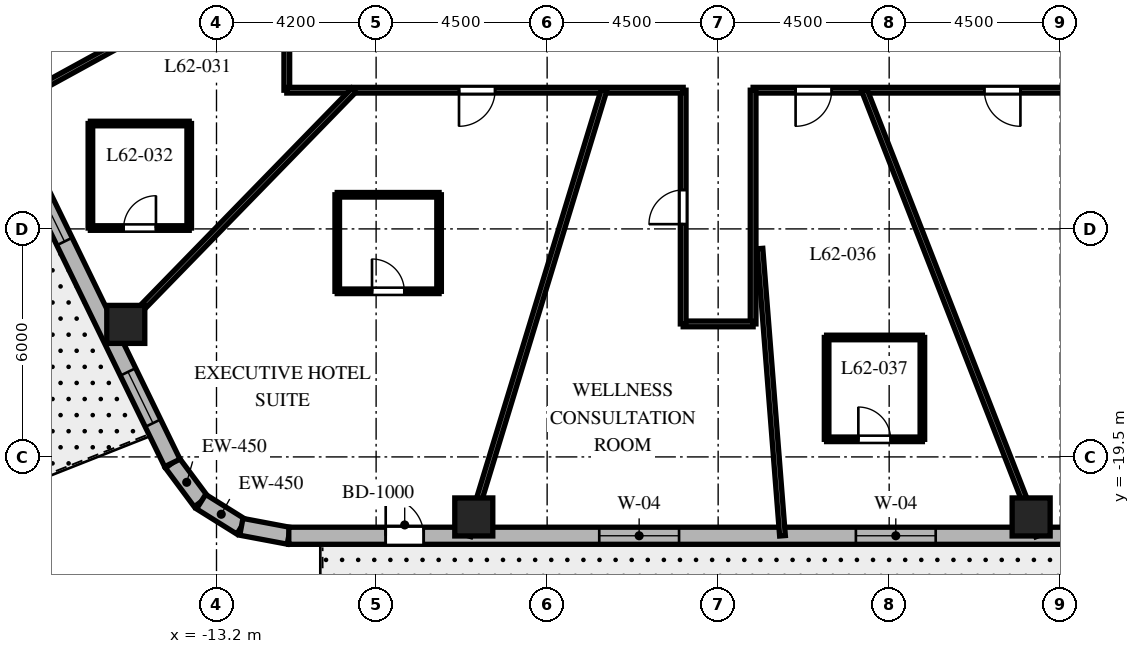
"""IFC4 building model, lengths in metres.
Left out: names, types, materials, properties, quantities, classifications, styles, units other than length and angle.
Written with IfcOpenShell. Run it as: python <this file> out.ifc"""

import sys

from ifc_helpers import new_model, si_unit, direction, frame, frame_2d, origin, origin_2d, place, context, subcontext, project, spatial, rectangle, extrude, element, fill, save


model = new_model("IFC4")
c1 = context("Model", 3, precision=1e-05, world=origin(), true_north=direction((0.0, 1.0)))
c2 = subcontext(c1, "Body", "Model", "MODEL_VIEW")
j1 = project(units=[si_unit("LENGTHUNIT", "METRE"), si_unit("PLANEANGLEUNIT", "RADIAN")], contexts=[c1])
p1 = place(None, origin())
s1 = spatial("IfcSite", under=j1, at=p1, CompositionType="ELEMENT")
p2 = place(p1, origin())
s2 = spatial("IfcBuilding", under=s1, at=p2, CompositionType="ELEMENT")
p3 = place(p2, frame((0.0, 0.0, 248.3)))
s3 = spatial("IfcBuildingStorey", under=s2, at=p3, CompositionType="ELEMENT", Elevation=248.3)
for number, where, z_axis, x_axis in (
    (1, (-6.43, -21.08, 0.0), (0.0, 0.0, 1.0), (1.0, 0.0, 0.0)),
    (2, (8.236, -21.08, 0.0), (0.0, 0.0, 1.0), (1.0, 0.0, 0.0)),
    (3, (-15.587, -16.013, 0.0), (0.0, 0.0, 1.0), (1.0, 0.0, 0.0)),
):
    element("IfcColumn", number, at=place(p3, frame(where, z_axis=z_axis, x_axis=x_axis)), inside=s3, PredefinedType="COLUMN", context=c2, shape_type="SweptSolid", body=[
        extrude(rectangle(XDim=1.0, YDim=1.0, at=origin_2d()), origin(), (0.0, 0.0, 1.0), 3.8),
    ])
p4 = place(p3, frame((-14.362, -19.658, 0.0), z_axis=(0.0, 0.0, 1.0), x_axis=(0.596642462792, -0.80250717853, 0.0)))
e4 = element("IfcWall", 4, at=p4, inside=s3, PredefinedType="SOLIDWALL", context=c2, shape_type="SweptSolid", body=[
    extrude(rectangle(XDim=1.27, YDim=0.45, at=frame_2d((0.635, 0.0))), origin(), (0.0, 0.0, 1.0), 3.5),
])
p5 = place(p3, frame((-13.604, -20.678, 0.0), z_axis=(0.0, 0.0, 1.0), x_axis=(0.847910404124, -0.53013955387, 0.0)))
e5 = element("IfcWall", 5, at=p5, inside=s3, PredefinedType="SOLIDWALL", context=c2, shape_type="SweptSolid", body=[
    extrude(rectangle(XDim=1.249, YDim=0.45, at=frame_2d((0.624, 0.0))), origin(), (0.0, 0.0, 1.0), 3.5),
])
p6 = place(p3, frame((-12.546, -21.34, 0.0), z_axis=(0.0, 0.0, 1.0), x_axis=(0.982686750835, -0.18527479519, 0.0)))
e6 = element("IfcWall", 6, at=p6, inside=s3, PredefinedType="SOLIDWALL", context=c2, shape_type="SweptSolid", body=[
    extrude(rectangle(XDim=1.27, YDim=0.45, at=frame_2d((0.635, 0.0))), origin(), (0.0, 0.0, 1.0), 3.5),
])
p7 = place(p3, frame((-11.298, -21.575, 0.0), z_axis=(0.0, 0.0, 1.0), x_axis=(1.0, 0.0, 0.0)))
e7 = element("IfcWall", 7, at=p7, inside=s3, PredefinedType="SOLIDWALL", context=c2, shape_type="SweptSolid", body=[
    extrude(rectangle(XDim=24.399, YDim=0.45, at=frame_2d((12.2, 0.0))), origin(), (0.0, 0.0, 1.0), 3.5),
])
p8 = place(p7, frame((2.55, 0.0, 0.0)))
e8 = element("IfcOpeningElement", 8, at=p8, cuts=e7, PredefinedType="OPENING", context=c2, shape_type="SweptSolid", body=[
    extrude(rectangle(XDim=1.0, YDim=2.15, at=frame_2d((0.5, 1.075))), frame((0.0, 0.235, 0.0), z_axis=(0.0, -1.0, 0.0), x_axis=(1.0, 0.0, 0.0)), (0.0, 0.0, 1.0), 0.47),
])
p9 = place(p7, frame((8.169, 0.0, 0.8)))
e9 = element("IfcOpeningElement", 9, at=p9, cuts=e7, PredefinedType="OPENING", context=c2, shape_type="SweptSolid", body=[
    extrude(rectangle(XDim=2.1, YDim=1.85, at=frame_2d((1.05, 0.925))), frame((0.0, 0.235, 0.0), z_axis=(0.0, -1.0, 0.0), x_axis=(1.0, 0.0, 0.0)), (0.0, 0.0, 1.0), 0.47),
])
p10 = place(p7, frame((14.922, 0.0, 0.8)))
e10 = element("IfcOpeningElement", 10, at=p10, cuts=e7, PredefinedType="OPENING", context=c2, shape_type="SweptSolid", body=[
    extrude(rectangle(XDim=2.1, YDim=1.85, at=frame_2d((1.05, 0.925))), frame((0.0, 0.235, 0.0), z_axis=(0.0, -1.0, 0.0), x_axis=(1.0, 0.0, 0.0)), (0.0, 0.0, 1.0), 0.47),
])
p11 = place(p7, frame((20.996, 0.0, 0.8)))
e11 = element("IfcOpeningElement", 11, at=p11, cuts=e7, PredefinedType="OPENING", context=c2, shape_type="SweptSolid", body=[
    extrude(rectangle(XDim=2.1, YDim=1.85, at=frame_2d((1.05, 0.925))), frame((0.0, 0.235, 0.0), z_axis=(0.0, -1.0, 0.0), x_axis=(1.0, 0.0, 0.0)), (0.0, 0.0, 1.0), 0.47),
])
p12 = place(p3, frame((-22.74, -2.452, 0.0), z_axis=(0.0, 0.0, 1.0), x_axis=(0.437753424814, -0.899095066755, 0.0)))
e12 = element("IfcWall", 12, at=p12, inside=s3, PredefinedType="SOLIDWALL", context=c2, shape_type="SweptSolid", body=[
    extrude(rectangle(XDim=19.137, YDim=0.45, at=frame_2d((9.569, 0.0))), origin(), (0.0, 0.0, 1.0), 3.5),
])
p13 = place(p12, frame((4.763, 0.0, 0.0)))
e13 = element("IfcOpeningElement", 13, at=p13, cuts=e12, PredefinedType="OPENING", context=c2, shape_type="SweptSolid", body=[
    extrude(rectangle(XDim=0.95, YDim=2.15, at=frame_2d((0.475, 1.075))), frame((0.0, 0.235, 0.0), z_axis=(0.0, -1.0, 0.0), x_axis=(1.0, 0.0, 0.0)), (0.0, 0.0, 1.0), 0.47),
])
p14 = place(p12, frame((1.216, 0.0, 0.8)))
e14 = element("IfcOpeningElement", 14, at=p14, cuts=e12, PredefinedType="OPENING", context=c2, shape_type="SweptSolid", body=[
    extrude(rectangle(XDim=1.5, YDim=1.8, at=frame_2d((0.75, 0.9))), frame((0.0, 0.235, 0.0), z_axis=(0.0, -1.0, 0.0), x_axis=(1.0, 0.0, 0.0)), (0.0, 0.0, 1.0), 0.47),
])
p15 = place(p12, frame((6.461, 0.0, 0.8)))
e15 = element("IfcOpeningElement", 15, at=p15, cuts=e12, PredefinedType="OPENING", context=c2, shape_type="SweptSolid", body=[
    extrude(rectangle(XDim=1.5, YDim=1.8, at=frame_2d((0.75, 0.9))), frame((0.0, 0.235, 0.0), z_axis=(0.0, -1.0, 0.0), x_axis=(1.0, 0.0, 0.0)), (0.0, 0.0, 1.0), 0.47),
])
p16 = place(p12, frame((11.156, 0.0, 0.8)))
e16 = element("IfcOpeningElement", 16, at=p16, cuts=e12, PredefinedType="OPENING", context=c2, shape_type="SweptSolid", body=[
    extrude(rectangle(XDim=1.5, YDim=1.8, at=frame_2d((0.75, 0.9))), frame((0.0, 0.235, 0.0), z_axis=(0.0, -1.0, 0.0), x_axis=(1.0, 0.0, 0.0)), (0.0, 0.0, 1.0), 0.47),
])
p17 = place(p12, frame((16.473, 0.0, 0.8)))
e17 = element("IfcOpeningElement", 17, at=p17, cuts=e12, PredefinedType="OPENING", context=c2, shape_type="SweptSolid", body=[
    extrude(rectangle(XDim=1.5, YDim=1.8, at=frame_2d((0.75, 0.9))), frame((0.0, 0.235, 0.0), z_axis=(0.0, -1.0, 0.0), x_axis=(1.0, 0.0, 0.0)), (0.0, 0.0, 1.0), 0.47),
])
p18 = place(p3, frame((-11.35, -9.85, 0.0), z_axis=(0.0, 0.0, 1.0), x_axis=(0.0, 1.0, 0.0)))
e18 = element("IfcWall", 18, at=p18, inside=s3, PredefinedType="PARTITIONING", context=c2, shape_type="SweptSolid", body=[
    extrude(rectangle(XDim=12.4, YDim=0.15, at=frame_2d((6.2, 0.0))), origin(), (0.0, 0.0, 1.0), 2.99),
])
p19 = place(p18, frame((8.835, 0.0, 0.0)))
e19 = element("IfcOpeningElement", 19, at=p19, cuts=e18, PredefinedType="OPENING", context=c2, shape_type="SweptSolid", body=[
    extrude(rectangle(XDim=0.95, YDim=2.03, at=frame_2d((0.475, 1.015))), frame((0.0, 0.085, 0.0), z_axis=(0.0, -1.0, 0.0), x_axis=(1.0, 0.0, 0.0)), (0.0, 0.0, 1.0), 0.17),
])
p20 = place(p18, frame((4.709, 0.0, 0.0)))
e20 = element("IfcOpeningElement", 20, at=p20, cuts=e18, PredefinedType="OPENING", context=c2, shape_type="SweptSolid", body=[
    extrude(rectangle(XDim=0.9, YDim=2.03, at=frame_2d((0.45, 1.015))), frame((0.0, 0.085, 0.0), z_axis=(0.0, -1.0, 0.0), x_axis=(1.0, 0.0, 0.0)), (0.0, 0.0, 1.0), 0.17),
])
p21 = place(p18, frame((1.457, 0.0, 0.0)))
e21 = element("IfcOpeningElement", 21, at=p21, cuts=e18, PredefinedType="OPENING", context=c2, shape_type="SweptSolid", body=[
    extrude(rectangle(XDim=0.95, YDim=2.03, at=frame_2d((0.475, 1.015))), frame((0.0, 0.085, 0.0), z_axis=(0.0, -1.0, 0.0), x_axis=(1.0, 0.0, 0.0)), (0.0, 0.0, 1.0), 0.17),
])
p22 = place(p3, frame((11.35, -9.85, 0.0), z_axis=(0.0, 0.0, 1.0), x_axis=(-1.0, 0.0, 0.0)))
e22 = element("IfcWall", 22, at=p22, inside=s3, PredefinedType="PARTITIONING", context=c2, shape_type="SweptSolid", body=[
    extrude(rectangle(XDim=10.43, YDim=0.15, at=frame_2d((5.215, 0.0))), origin(), (0.0, 0.0, 1.0), 2.99),
])
p23 = place(p22, frame((8.362, 0.0, 0.0)))
e23 = element("IfcOpeningElement", 23, at=p23, cuts=e22, PredefinedType="OPENING", context=c2, shape_type="SweptSolid", body=[
    extrude(rectangle(XDim=0.95, YDim=2.03, at=frame_2d((0.475, 1.015))), frame((0.0, 0.085, 0.0), z_axis=(0.0, -1.0, 0.0), x_axis=(1.0, 0.0, 0.0)), (0.0, 0.0, 1.0), 0.17),
])
p24 = place(p22, frame((3.396, 0.0, 0.0)))
e24 = element("IfcOpeningElement", 24, at=p24, cuts=e22, PredefinedType="OPENING", context=c2, shape_type="SweptSolid", body=[
    extrude(rectangle(XDim=0.95, YDim=2.03, at=frame_2d((0.475, 1.015))), frame((0.0, 0.085, 0.0), z_axis=(0.0, -1.0, 0.0), x_axis=(1.0, 0.0, 0.0)), (0.0, 0.0, 1.0), 0.17),
])
p25 = place(p3, frame((0.92, -9.85, 0.0), z_axis=(0.0, 0.0, 1.0), x_axis=(0.0, -1.0, 0.0)))
e25 = element("IfcWall", 25, at=p25, inside=s3, PredefinedType="PARTITIONING", context=c2, shape_type="SweptSolid", body=[
    extrude(rectangle(XDim=6.15, YDim=0.15, at=frame_2d((3.075, 0.0))), origin(), (0.0, 0.0, 1.0), 3.026),
])
p26 = place(p3, frame((0.92, -16.0, 0.0), z_axis=(0.0, 0.0, 1.0), x_axis=(-1.0, 0.0, 0.0)))
e26 = element("IfcWall", 26, at=p26, inside=s3, PredefinedType="PARTITIONING", context=c2, shape_type="SweptSolid", body=[
    extrude(rectangle(XDim=1.84, YDim=0.15, at=frame_2d((0.92, 0.0))), origin(), (0.0, 0.0, 1.0), 3.5),
])
p27 = place(p3, frame((-0.92, -16.0, 0.0), z_axis=(0.0, 0.0, 1.0), x_axis=(0.0, 1.0, 0.0)))
e27 = element("IfcWall", 27, at=p27, inside=s3, PredefinedType="PARTITIONING", context=c2, shape_type="SweptSolid", body=[
    extrude(rectangle(XDim=6.15, YDim=0.15, at=frame_2d((3.075, 0.0))), origin(), (0.0, 0.0, 1.0), 3.026),
])
p28 = place(p27, frame((2.625, 0.0, 0.0)))
e28 = element("IfcOpeningElement", 28, at=p28, cuts=e27, PredefinedType="OPENING", context=c2, shape_type="SweptSolid", body=[
    extrude(rectangle(XDim=0.9, YDim=2.03, at=frame_2d((0.45, 1.015))), frame((0.0, 0.085, 0.0), z_axis=(0.0, -1.0, 0.0), x_axis=(1.0, 0.0, 0.0)), (0.0, 0.0, 1.0), 0.17),
])
p29 = place(p3, frame((-0.92, -9.85, 0.0), z_axis=(0.0, 0.0, 1.0), x_axis=(-1.0, 0.0, 0.0)))
e29 = element("IfcWall", 29, at=p29, inside=s3, PredefinedType="PARTITIONING", context=c2, shape_type="SweptSolid", body=[
    extrude(rectangle(XDim=10.43, YDim=0.15, at=frame_2d((5.215, 0.0))), origin(), (0.0, 0.0, 1.0), 2.99),
])
p30 = place(p29, frame((4.949, 0.0, 0.0)))
e30 = element("IfcOpeningElement", 30, at=p30, cuts=e29, PredefinedType="OPENING", context=c2, shape_type="SweptSolid", body=[
    extrude(rectangle(XDim=0.95, YDim=2.03, at=frame_2d((0.475, 1.015))), frame((0.0, 0.085, 0.0), z_axis=(0.0, -1.0, 0.0), x_axis=(1.0, 0.0, 0.0)), (0.0, 0.0, 1.0), 0.17),
])
p31 = place(p3, frame((-11.35, -6.227, 0.0), z_axis=(0.0, 0.0, 1.0), x_axis=(-0.876723190824, -0.480995266786, 0.0)))
e31 = element("IfcWall", 31, at=p31, inside=s3, PredefinedType="PARTITIONING", context=c2, shape_type="SweptSolid", body=[
    extrude(rectangle(XDim=8.598, YDim=0.15, at=frame_2d((4.299, 0.0))), origin(), (0.0, 0.0, 1.0), 2.74),
])
p32 = place(p3, frame((-9.588, -9.85, 0.0), z_axis=(0.0, 0.0, 1.0), x_axis=(-0.697519469595, -0.716565830567, 0.0)))
e32 = element("IfcWall", 32, at=p32, inside=s3, PredefinedType="PARTITIONING", context=c2, shape_type="SweptSolid", body=[
    extrude(rectangle(XDim=9.126, YDim=0.15, at=frame_2d((4.563, 0.0))), origin(), (0.0, 0.0, 1.0), 2.74),
])
p33 = place(p3, frame((-3.004, -9.85, 0.0), z_axis=(0.0, 0.0, 1.0), x_axis=(-0.291775760688, -0.956486751333, 0.0)))
e33 = element("IfcWall", 33, at=p33, inside=s3, PredefinedType="PARTITIONING", context=c2, shape_type="SweptSolid", body=[
    extrude(rectangle(XDim=12.258, YDim=0.15, at=frame_2d((6.129, 0.0))), origin(), (0.0, 0.0, 1.0), 2.74),
])
p34 = place(p3, frame((1.1, -14.018, 0.0), z_axis=(0.0, 0.0, 1.0), x_axis=(0.078228275349, -0.996935472804, 0.0)))
e34 = element("IfcWall", 34, at=p34, inside=s3, PredefinedType="PARTITIONING", context=c2, shape_type="SweptSolid", body=[
    extrude(rectangle(XDim=7.581, YDim=0.15, at=frame_2d((3.79, 0.0))), origin(), (0.0, 0.0, 1.0), 2.74),
])
p35 = place(p3, frame((3.848, -9.85, 0.0), z_axis=(0.0, 0.0, 1.0), x_axis=(0.363921778212, -0.931429513889, 0.0)))
e35 = element("IfcWall", 35, at=p35, inside=s3, PredefinedType="PARTITIONING", context=c2, shape_type="SweptSolid", body=[
    extrude(rectangle(XDim=12.588, YDim=0.15, at=frame_2d((6.294, 0.0))), origin(), (0.0, 0.0, 1.0), 2.74),
])
p36 = place(p3, frame((-16.518, -13.477, 0.0), z_axis=(0.0, 0.0, 1.0), x_axis=(1.0, 0.0, 0.0)))
e36 = element("IfcWall", 36, at=p36, inside=s3, PredefinedType="PARTITIONING", context=c2, shape_type="SweptSolid", body=[
    extrude(rectangle(XDim=2.6, YDim=0.12, at=frame_2d((1.3, 0.0))), origin(), (0.0, 0.0, 1.0), 3.5),
])
p37 = place(p36, frame((0.875, 0.0, 0.0)))
e37 = element("IfcOpeningElement", 37, at=p37, cuts=e36, PredefinedType="OPENING", context=c2, shape_type="SweptSolid", body=[
    extrude(rectangle(XDim=0.85, YDim=2.03, at=frame_2d((0.425, 1.015))), frame((0.0, 0.07, 0.0), z_axis=(0.0, -1.0, 0.0), x_axis=(1.0, 0.0, 0.0)), (0.0, 0.0, 1.0), 0.14),
])
p38 = place(p3, frame((-13.918, -13.477, 0.0), z_axis=(0.0, 0.0, 1.0), x_axis=(0.0, 1.0, 0.0)))
e38 = element("IfcWall", 38, at=p38, inside=s3, PredefinedType="PARTITIONING", context=c2, shape_type="SweptSolid", body=[
    extrude(rectangle(XDim=2.75, YDim=0.12, at=frame_2d((1.375, 0.0))), origin(), (0.0, 0.0, 1.0), 3.026),
])
p39 = place(p3, frame((-13.918, -10.727, 0.0), z_axis=(0.0, 0.0, 1.0), x_axis=(-1.0, 0.0, 0.0)))
e39 = element("IfcWall", 39, at=p39, inside=s3, PredefinedType="PARTITIONING", context=c2, shape_type="SweptSolid", body=[
    extrude(rectangle(XDim=2.6, YDim=0.12, at=frame_2d((1.3, 0.0))), origin(), (0.0, 0.0, 1.0), 3.026),
])
p40 = place(p3, frame((-16.518, -10.727, 0.0), z_axis=(0.0, 0.0, 1.0), x_axis=(0.0, -1.0, 0.0)))
e40 = element("IfcWall", 40, at=p40, inside=s3, PredefinedType="PARTITIONING", context=c2, shape_type="SweptSolid", body=[
    extrude(rectangle(XDim=2.75, YDim=0.12, at=frame_2d((1.375, 0.0))), origin(), (0.0, 0.0, 1.0), 3.5),
])
p41 = place(p3, frame((-10.023, -15.142, 0.0), z_axis=(0.0, 0.0, 1.0), x_axis=(1.0, 0.0, 0.0)))
e41 = element("IfcWall", 41, at=p41, inside=s3, PredefinedType="PARTITIONING", context=c2, shape_type="SweptSolid", body=[
    extrude(rectangle(XDim=2.68, YDim=0.12, at=frame_2d((1.34, 0.0))), origin(), (0.0, 0.0, 1.0), 3.072),
])
p42 = place(p41, frame((0.915, 0.0, 0.0)))
e42 = element("IfcOpeningElement", 42, at=p42, cuts=e41, PredefinedType="OPENING", context=c2, shape_type="SweptSolid", body=[
    extrude(rectangle(XDim=0.85, YDim=2.03, at=frame_2d((0.425, 1.015))), frame((0.0, 0.07, 0.0), z_axis=(0.0, -1.0, 0.0), x_axis=(1.0, 0.0, 0.0)), (0.0, 0.0, 1.0), 0.14),
])
p43 = place(p3, frame((-7.343, -15.142, 0.0), z_axis=(0.0, 0.0, 1.0), x_axis=(0.0, 1.0, 0.0)))
e43 = element("IfcWall", 43, at=p43, inside=s3, PredefinedType="PARTITIONING", context=c2, shape_type="SweptSolid", body=[
    extrude(rectangle(XDim=2.54, YDim=0.12, at=frame_2d((1.27, 0.0))), origin(), (0.0, 0.0, 1.0), 2.94),
])
p44 = place(p3, frame((-7.343, -12.602, 0.0), z_axis=(0.0, 0.0, 1.0), x_axis=(-1.0, 0.0, 0.0)))
e44 = element("IfcWall", 44, at=p44, inside=s3, PredefinedType="PARTITIONING", context=c2, shape_type="SweptSolid", body=[
    extrude(rectangle(XDim=2.68, YDim=0.12, at=frame_2d((1.34, 0.0))), origin(), (0.0, 0.0, 1.0), 2.94),
])
p45 = place(p3, frame((-10.023, -12.602, 0.0), z_axis=(0.0, 0.0, 1.0), x_axis=(0.0, -1.0, 0.0)))
e45 = element("IfcWall", 45, at=p45, inside=s3, PredefinedType="PARTITIONING", context=c2, shape_type="SweptSolid", body=[
    extrude(rectangle(XDim=2.54, YDim=0.12, at=frame_2d((1.27, 0.0))), origin(), (0.0, 0.0, 1.0), 3.072),
])
p46 = place(p3, frame((2.854, -19.037, 0.0), z_axis=(0.0, 0.0, 1.0), x_axis=(1.0, 0.0, 0.0)))
e46 = element("IfcWall", 46, at=p46, inside=s3, PredefinedType="PARTITIONING", context=c2, shape_type="SweptSolid", body=[
    extrude(rectangle(XDim=2.52, YDim=0.12, at=frame_2d((1.26, 0.0))), origin(), (0.0, 0.0, 1.0), 3.5),
])
p47 = place(p46, frame((0.835, 0.0, 0.0)))
e47 = element("IfcOpeningElement", 47, at=p47, cuts=e46, PredefinedType="OPENING", context=c2, shape_type="SweptSolid", body=[
    extrude(rectangle(XDim=0.85, YDim=2.03, at=frame_2d((0.425, 1.015))), frame((0.0, 0.07, 0.0), z_axis=(0.0, -1.0, 0.0), x_axis=(1.0, 0.0, 0.0)), (0.0, 0.0, 1.0), 0.14),
])
p48 = place(p3, frame((5.374, -19.037, 0.0), z_axis=(0.0, 0.0, 1.0), x_axis=(0.0, 1.0, 0.0)))
e48 = element("IfcWall", 48, at=p48, inside=s3, PredefinedType="PARTITIONING", context=c2, shape_type="SweptSolid", body=[
    extrude(rectangle(XDim=2.68, YDim=0.12, at=frame_2d((1.34, 0.0))), origin(), (0.0, 0.0, 1.0), 2.94),
])
p49 = place(p3, frame((5.374, -16.357, 0.0), z_axis=(0.0, 0.0, 1.0), x_axis=(-1.0, 0.0, 0.0)))
e49 = element("IfcWall", 49, at=p49, inside=s3, PredefinedType="PARTITIONING", context=c2, shape_type="SweptSolid", body=[
    extrude(rectangle(XDim=2.52, YDim=0.12, at=frame_2d((1.26, 0.0))), origin(), (0.0, 0.0, 1.0), 3.5),
])
p50 = place(p3, frame((2.854, -16.357, 0.0), z_axis=(0.0, 0.0, 1.0), x_axis=(0.0, -1.0, 0.0)))
e50 = element("IfcWall", 50, at=p50, inside=s3, PredefinedType="PARTITIONING", context=c2, shape_type="SweptSolid", body=[
    extrude(rectangle(XDim=2.68, YDim=0.12, at=frame_2d((1.34, 0.0))), origin(), (0.0, 0.0, 1.0), 2.94),
])
p51 = place(p8, origin())
e51 = element("IfcDoor", 51, at=p51, inside=s3, OperationType="SINGLE_SWING_LEFT", PredefinedType="DOOR", context=c2, shape_type="SweptSolid", body=[
    extrude(rectangle(XDim=1.0, YDim=2.15, at=frame_2d((0.5, 1.075))), frame((0.0, 0.025, 0.0), z_axis=(0.0, -1.0, 0.0), x_axis=(1.0, 0.0, 0.0)), (0.0, 0.0, 1.0), 0.05),
])
fill(e8, e51)
p52 = place(p9, origin())
e52 = element("IfcWindow", 52, at=p52, inside=s3, PartitioningType="SINGLE_PANEL", PredefinedType="WINDOW", context=c2, shape_type="SweptSolid", body=[
    extrude(rectangle(XDim=2.1, YDim=1.85, at=frame_2d((1.05, 0.925))), frame((0.0, 0.03, 0.0), z_axis=(0.0, -1.0, 0.0), x_axis=(1.0, 0.0, 0.0)), (0.0, 0.0, 1.0), 0.06),
])
fill(e9, e52)
p53 = place(p10, origin())
e53 = element("IfcWindow", 53, at=p53, inside=s3, PartitioningType="SINGLE_PANEL", PredefinedType="WINDOW", context=c2, shape_type="SweptSolid", body=[
    extrude(rectangle(XDim=2.1, YDim=1.85, at=frame_2d((1.05, 0.925))), frame((0.0, 0.03, 0.0), z_axis=(0.0, -1.0, 0.0), x_axis=(1.0, 0.0, 0.0)), (0.0, 0.0, 1.0), 0.06),
])
fill(e10, e53)
p54 = place(p16, origin())
e54 = element("IfcWindow", 54, at=p54, inside=s3, PartitioningType="SINGLE_PANEL", PredefinedType="WINDOW", context=c2, shape_type="SweptSolid", body=[
    extrude(rectangle(XDim=1.5, YDim=1.8, at=frame_2d((0.75, 0.9))), frame((0.0, 0.03, 0.0), z_axis=(0.0, -1.0, 0.0), x_axis=(1.0, 0.0, 0.0)), (0.0, 0.0, 1.0), 0.06),
])
fill(e16, e54)
p55 = place(p17, origin())
e55 = element("IfcWindow", 55, at=p55, inside=s3, PartitioningType="SINGLE_PANEL", PredefinedType="WINDOW", context=c2, shape_type="SweptSolid", body=[
    extrude(rectangle(XDim=1.5, YDim=1.8, at=frame_2d((0.75, 0.9))), frame((0.0, 0.03, 0.0), z_axis=(0.0, -1.0, 0.0), x_axis=(1.0, 0.0, 0.0)), (0.0, 0.0, 1.0), 0.06),
])
fill(e17, e55)
p56 = place(p37, origin())
e56 = element("IfcDoor", 56, at=p56, inside=s3, OperationType="SINGLE_SWING_RIGHT", PredefinedType="DOOR", context=c2, shape_type="SweptSolid", body=[
    extrude(rectangle(XDim=0.85, YDim=2.03, at=frame_2d((0.425, 1.015))), frame((0.0, 0.025, 0.0), z_axis=(0.0, -1.0, 0.0), x_axis=(1.0, 0.0, 0.0)), (0.0, 0.0, 1.0), 0.05),
])
fill(e37, e56)
p57 = place(p30, origin())
e57 = element("IfcDoor", 57, at=p57, inside=s3, OperationType="SINGLE_SWING_RIGHT", PredefinedType="DOOR", context=c2, shape_type="SweptSolid", body=[
    extrude(rectangle(XDim=0.95, YDim=2.03, at=frame_2d((0.475, 1.015))), frame((0.0, 0.025, 0.0), z_axis=(0.0, -1.0, 0.0), x_axis=(1.0, 0.0, 0.0)), (0.0, 0.0, 1.0), 0.05),
])
fill(e30, e57)
p58 = place(p42, origin())
e58 = element("IfcDoor", 58, at=p58, inside=s3, OperationType="SINGLE_SWING_LEFT", PredefinedType="DOOR", context=c2, shape_type="SweptSolid", body=[
    extrude(rectangle(XDim=0.85, YDim=2.03, at=frame_2d((0.425, 1.015))), frame((0.0, 0.025, 0.0), z_axis=(0.0, -1.0, 0.0), x_axis=(1.0, 0.0, 0.0)), (0.0, 0.0, 1.0), 0.05),
])
fill(e42, e58)
p59 = place(p28, origin())
e59 = element("IfcDoor", 59, at=p59, inside=s3, OperationType="SINGLE_SWING_LEFT", PredefinedType="DOOR", context=c2, shape_type="SweptSolid", body=[
    extrude(rectangle(XDim=0.9, YDim=2.03, at=frame_2d((0.45, 1.015))), frame((0.0, 0.025, 0.0), z_axis=(0.0, -1.0, 0.0), x_axis=(1.0, 0.0, 0.0)), (0.0, 0.0, 1.0), 0.05),
])
fill(e28, e59)
p60 = place(p23, origin())
e60 = element("IfcDoor", 60, at=p60, inside=s3, OperationType="SINGLE_SWING_RIGHT", PredefinedType="DOOR", context=c2, shape_type="SweptSolid", body=[
    extrude(rectangle(XDim=0.95, YDim=2.03, at=frame_2d((0.475, 1.015))), frame((0.0, 0.025, 0.0), z_axis=(0.0, -1.0, 0.0), x_axis=(1.0, 0.0, 0.0)), (0.0, 0.0, 1.0), 0.05),
])
fill(e23, e60)
p61 = place(p47, origin())
e61 = element("IfcDoor", 61, at=p61, inside=s3, OperationType="SINGLE_SWING_LEFT", PredefinedType="DOOR", context=c2, shape_type="SweptSolid", body=[
    extrude(rectangle(XDim=0.85, YDim=2.03, at=frame_2d((0.425, 1.015))), frame((0.0, 0.025, 0.0), z_axis=(0.0, -1.0, 0.0), x_axis=(1.0, 0.0, 0.0)), (0.0, 0.0, 1.0), 0.05),
])
fill(e47, e61)
p62 = place(p24, origin())
e62 = element("IfcDoor", 62, at=p62, inside=s3, OperationType="SINGLE_SWING_LEFT", PredefinedType="DOOR", context=c2, shape_type="SweptSolid", body=[
    extrude(rectangle(XDim=0.95, YDim=2.03, at=frame_2d((0.475, 1.015))), frame((0.0, 0.025, 0.0), z_axis=(0.0, -1.0, 0.0), x_axis=(1.0, 0.0, 0.0)), (0.0, 0.0, 1.0), 0.05),
])
fill(e24, e62)
save(model, sys.argv[1])
